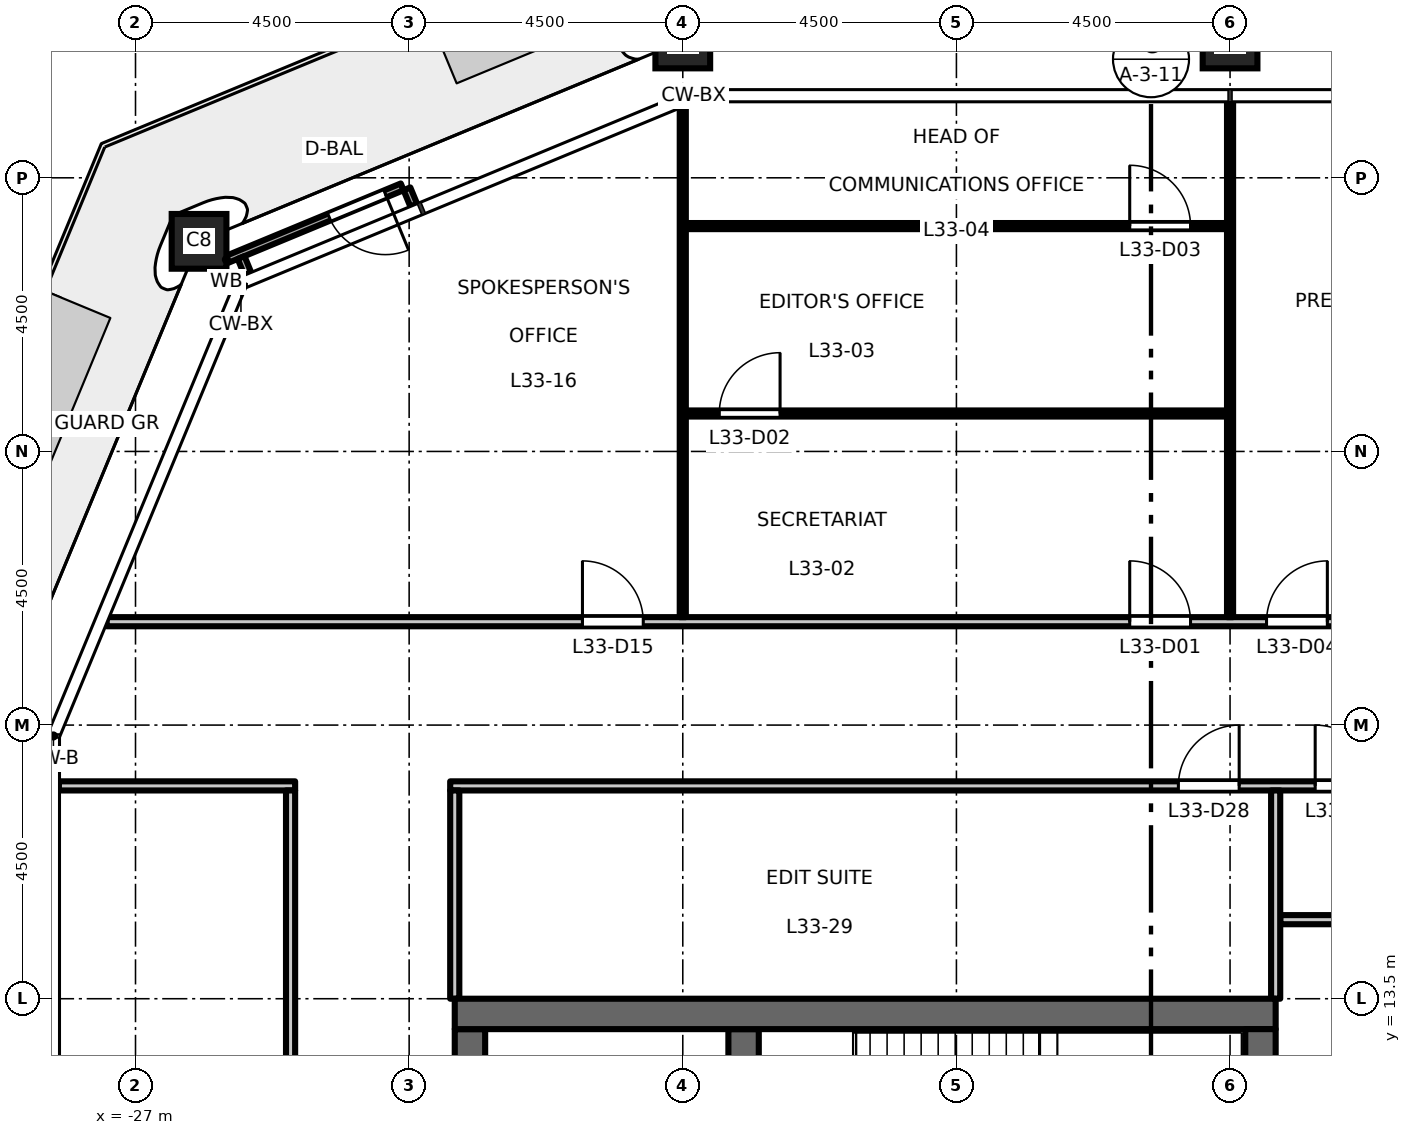
"""IFC4 building model, lengths in metres.
Left out: names, types, materials, properties, quantities, classifications, styles, units other than length and angle.
Written with IfcOpenShell. Run it as: python <this file> out.ifc"""

import sys

from ifc_helpers import new_model, si_unit, direction, frame, frame_2d, origin, origin_2d, place, context, subcontext, project, spatial, rectangle, hollow_rectangle, extrude, element, fill, save


model = new_model("IFC4")
c1 = context("Model", 3, precision=1e-05, world=origin(), true_north=direction((0.0, 1.0)))
c2 = subcontext(c1, "Body", "Model", "MODEL_VIEW")
j1 = project(units=[si_unit("LENGTHUNIT", "METRE"), si_unit("PLANEANGLEUNIT", "RADIAN")], contexts=[c1])
p1 = place(None, origin())
s1 = spatial("IfcSite", under=j1, at=p1, CompositionType="ELEMENT")
p2 = place(p1, origin())
s2 = spatial("IfcBuilding", under=s1, at=p2, CompositionType="ELEMENT")
p3 = place(p2, frame((0.0, 0.0, 154.2)))
s3 = spatial("IfcBuildingStorey", under=s2, at=p3, CompositionType="ELEMENT", Elevation=154.2)
for number, where, z_axis, x_axis in (
    (1, (-9.0, 29.25, 0.0), (0.0, 0.0, 1.0), (1.0, 0.0, 0.0)),
    (2, (-18.0, 29.25, 0.0), (0.0, 0.0, 1.0), (1.0, 0.0, 0.0)),
    (3, (-25.955, 25.955, 0.0), (0.0, 0.0, 1.0), (1.0, 0.0, 0.0)),
):
    element("IfcColumn", number, at=place(p3, frame(where, z_axis=z_axis, x_axis=x_axis)), inside=s3, PredefinedType="COLUMN", context=c2, shape_type="SweptSolid", body=[
        extrude(hollow_rectangle(XDim=0.9, YDim=0.9, WallThickness=0.05, at=origin_2d()), origin(), (0.0, 0.0, 1.0), 4.5),
    ])
p4 = place(p3, frame((-21.5, -13.0, 0.0), z_axis=(0.0, 0.0, 1.0), x_axis=(0.0, 1.0, 0.0)))
e4 = element("IfcWall", 4, at=p4, inside=s3, PredefinedType="SHEAR", context=c2, shape_type="SweptSolid", body=[
    extrude(rectangle(XDim=26.0, YDim=0.5, at=frame_2d((13.0, 0.0))), origin(), (0.0, 0.0, 1.0), 4.35),
])
p5 = place(p4, frame((16.825, 0.0, 0.0)))
e5 = element("IfcOpeningElement", 5, at=p5, cuts=e4, PredefinedType="OPENING", context=c2, shape_type="SweptSolid", body=[
    extrude(rectangle(XDim=1.8, YDim=2.1, at=frame_2d((0.9, 1.05))), frame((0.0, 0.26, 0.0), z_axis=(0.0, -1.0, 0.0), x_axis=(1.0, 0.0, 0.0)), (0.0, 0.0, 1.0), 0.52),
])
p6 = place(p4, frame((7.375, 0.0, 0.0)))
e6 = element("IfcOpeningElement", 6, at=p6, cuts=e4, PredefinedType="OPENING", context=c2, shape_type="SweptSolid", body=[
    extrude(rectangle(XDim=1.8, YDim=2.1, at=frame_2d((0.9, 1.05))), frame((0.0, 0.26, 0.0), z_axis=(0.0, -1.0, 0.0), x_axis=(1.0, 0.0, 0.0)), (0.0, 0.0, 1.0), 0.52),
])
p7 = place(p4, frame((1.3, 0.0, 0.0)))
e7 = element("IfcOpeningElement", 7, at=p7, cuts=e4, PredefinedType="OPENING", context=c2, shape_type="SweptSolid", body=[
    extrude(rectangle(XDim=0.9, YDim=2.1, at=frame_2d((0.45, 1.05))), frame((0.0, 0.26, 0.0), z_axis=(0.0, -1.0, 0.0), x_axis=(1.0, 0.0, 0.0)), (0.0, 0.0, 1.0), 0.52),
])
p8 = place(p3, frame((-17.0, 6.425, 0.0), z_axis=(0.0, 0.0, 1.0), x_axis=(0.0, 1.0, 0.0)))
e8 = element("IfcWall", 8, at=p8, inside=s3, PredefinedType="SHEAR", context=c2, shape_type="SweptSolid", body=[
    extrude(rectangle(XDim=6.575, YDim=0.5, at=frame_2d((3.288, 0.0))), origin(), (0.0, 0.0, 1.0), 4.35),
])
p9 = place(p3, frame((-8.25, 13.25, 0.0), z_axis=(0.0, 0.0, 1.0), x_axis=(-1.0, 0.0, 0.0)))
e9 = element("IfcWall", 9, at=p9, inside=s3, PredefinedType="SHEAR", context=c2, shape_type="SweptSolid", body=[
    extrude(rectangle(XDim=13.5, YDim=0.5, at=frame_2d((6.75, 0.0))), origin(), (0.0, 0.0, 1.0), 4.35),
])
p10 = place(p3, frame((-8.5, -13.0, 0.0), z_axis=(0.0, 0.0, 1.0), x_axis=(0.0, 1.0, 0.0)))
e10 = element("IfcWall", 10, at=p10, inside=s3, PredefinedType="SHEAR", context=c2, shape_type="SweptSolid", body=[
    extrude(rectangle(XDim=26.0, YDim=0.5, at=frame_2d((13.0, 0.0))), origin(), (0.0, 0.0, 1.0), 4.35),
])
for number, where, z_axis, x_axis in (
    (11, (-22.425, 26.551, 0.0), (0.0, 0.0, 1.0), (-0.382, 0.924, 0.0)),
    (12, (-25.153, 25.421, 0.0), (0.0, 0.0, 1.0), (-0.383, 0.924, 0.0)),
):
    element("IfcWall", number, at=place(p3, frame(where, z_axis=z_axis, x_axis=x_axis)), inside=s3, PredefinedType="STANDARD", context=c2, shape_type="SweptSolid", body=[
        extrude(rectangle(XDim=0.29, YDim=0.12, at=frame_2d((0.145, 0.0))), origin(), (0.0, 0.0, 1.0), 4.35),
    ])
p11 = place(p3, frame((-22.615, 26.852, 0.0), z_axis=(0.0, 0.0, 1.0), x_axis=(-0.923876066186, -0.382691800707, 0.0)))
e13 = element("IfcWall", 13, at=p11, inside=s3, PredefinedType="STANDARD", context=c2, shape_type="SweptSolid", body=[
    extrude(rectangle(XDim=3.128, YDim=0.12, at=frame_2d((1.564, 0.0))), origin(), (0.0, 0.0, 1.0), 4.35),
])
p12 = place(p11, frame((0.3, 0.0, 0.0)))
e14 = element("IfcOpeningElement", 14, at=p12, cuts=e13, PredefinedType="OPENING", context=c2, shape_type="SweptSolid", body=[
    extrude(rectangle(XDim=1.0, YDim=2.4, at=frame_2d((0.5, 1.2))), frame((0.0, 0.07, 0.0), z_axis=(0.0, -1.0, 0.0), x_axis=(1.0, 0.0, 0.0)), (0.0, 0.0, 1.0), 0.14),
])
p13 = place(p3, frame((-8.175, 14.8, 0.0), z_axis=(0.0, 0.0, 1.0), x_axis=(1.0, 0.0, 0.0)))
e15 = element("IfcWall", 15, at=p13, inside=s3, PredefinedType="PARTITIONING", context=c2, shape_type="SweptSolid", body=[
    extrude(rectangle(XDim=14.955, YDim=0.15, at=frame_2d((7.478, 0.0))), origin(), (0.0, 0.0, 1.0), 4.35),
])
p14 = place(p13, frame((4.325, 0.0, 0.0)))
e16 = element("IfcOpeningElement", 16, at=p14, cuts=e15, PredefinedType="OPENING", context=c2, shape_type="SweptSolid", body=[
    extrude(rectangle(XDim=1.0, YDim=2.1, at=frame_2d((0.5, 1.05))), frame((0.0, 0.085, 0.0), z_axis=(0.0, -1.0, 0.0), x_axis=(1.0, 0.0, 0.0)), (0.0, 0.0, 1.0), 0.17),
])
p15 = place(p13, frame((6.575, 0.0, 0.0)))
e17 = element("IfcOpeningElement", 17, at=p15, cuts=e15, PredefinedType="OPENING", context=c2, shape_type="SweptSolid", body=[
    extrude(rectangle(XDim=1.0, YDim=2.1, at=frame_2d((0.5, 1.05))), frame((0.0, 0.085, 0.0), z_axis=(0.0, -1.0, 0.0), x_axis=(1.0, 0.0, 0.0)), (0.0, 0.0, 1.0), 0.17),
])
p16 = place(p13, frame((13.325, 0.0, 0.0)))
e18 = element("IfcOpeningElement", 18, at=p16, cuts=e15, PredefinedType="OPENING", context=c2, shape_type="SweptSolid", body=[
    extrude(rectangle(XDim=1.0, YDim=2.1, at=frame_2d((0.5, 1.05))), frame((0.0, 0.085, 0.0), z_axis=(0.0, -1.0, 0.0), x_axis=(1.0, 0.0, 0.0)), (0.0, 0.0, 1.0), 0.17),
])
p17 = place(p3, frame((-28.26, 17.0, 0.0), z_axis=(0.0, 0.0, 1.0), x_axis=(1.0, 0.0, 0.0)))
e19 = element("IfcWall", 19, at=p17, inside=s3, PredefinedType="PARTITIONING", context=c2, shape_type="SweptSolid", body=[
    extrude(rectangle(XDim=3.885, YDim=0.15, at=frame_2d((1.942, 0.0))), origin(), (0.0, 0.0, 1.0), 4.35),
])
p18 = place(p3, frame((-21.825, 17.0, 0.0), z_axis=(0.0, 0.0, 1.0), x_axis=(1.0, 0.0, 0.0)))
e20 = element("IfcWall", 20, at=p18, inside=s3, PredefinedType="PARTITIONING", context=c2, shape_type="SweptSolid", body=[
    extrude(rectangle(XDim=43.65, YDim=0.15, at=frame_2d((21.825, 0.0))), origin(), (0.0, 0.0, 1.0), 4.35),
])
p19 = place(p18, frame((14.225, 0.0, 0.0)))
e21 = element("IfcOpeningElement", 21, at=p19, cuts=e20, PredefinedType="OPENING", context=c2, shape_type="SweptSolid", body=[
    extrude(rectangle(XDim=1.0, YDim=2.1, at=frame_2d((0.5, 1.05))), frame((0.0, 0.085, 0.0), z_axis=(0.0, -1.0, 0.0), x_axis=(1.0, 0.0, 0.0)), (0.0, 0.0, 1.0), 0.17),
])
p20 = place(p18, frame((11.975, 0.0, 0.0)))
e22 = element("IfcOpeningElement", 22, at=p20, cuts=e20, PredefinedType="OPENING", context=c2, shape_type="SweptSolid", body=[
    extrude(rectangle(XDim=1.0, YDim=2.1, at=frame_2d((0.5, 1.05))), frame((0.0, 0.085, 0.0), z_axis=(0.0, -1.0, 0.0), x_axis=(1.0, 0.0, 0.0)), (0.0, 0.0, 1.0), 0.17),
])
p21 = place(p18, frame((30.725, 0.0, 0.0)))
e23 = element("IfcOpeningElement", 23, at=p21, cuts=e20, PredefinedType="OPENING", context=c2, shape_type="SweptSolid", body=[
    extrude(rectangle(XDim=1.0, YDim=2.1, at=frame_2d((0.5, 1.05))), frame((0.0, 0.085, 0.0), z_axis=(0.0, -1.0, 0.0), x_axis=(1.0, 0.0, 0.0)), (0.0, 0.0, 1.0), 0.17),
])
p22 = place(p3, frame((-27.474, 19.7, 0.0), z_axis=(0.0, 0.0, 1.0), x_axis=(1.0, 0.0, 0.0)))
e24 = element("IfcWall", 24, at=p22, inside=s3, PredefinedType="PARTITIONING", context=c2, shape_type="SweptSolid", body=[
    extrude(rectangle(XDim=54.948, YDim=0.15, at=frame_2d((27.474, 0.0))), origin(), (0.0, 0.0, 1.0), 4.35),
])
p23 = place(p22, frame((16.824, 0.0, 0.0)))
e25 = element("IfcOpeningElement", 25, at=p23, cuts=e24, PredefinedType="OPENING", context=c2, shape_type="SweptSolid", body=[
    extrude(rectangle(XDim=1.0, YDim=2.1, at=frame_2d((0.5, 1.05))), frame((0.0, 0.085, 0.0), z_axis=(0.0, -1.0, 0.0), x_axis=(1.0, 0.0, 0.0)), (0.0, 0.0, 1.0), 0.17),
])
p24 = place(p22, frame((19.074, 0.0, 0.0)))
e26 = element("IfcOpeningElement", 26, at=p24, cuts=e24, PredefinedType="OPENING", context=c2, shape_type="SweptSolid", body=[
    extrude(rectangle(XDim=1.0, YDim=2.1, at=frame_2d((0.5, 1.05))), frame((0.0, 0.085, 0.0), z_axis=(0.0, -1.0, 0.0), x_axis=(1.0, 0.0, 0.0)), (0.0, 0.0, 1.0), 0.17),
])
p25 = place(p22, frame((34.824, 0.0, 0.0)))
e27 = element("IfcOpeningElement", 27, at=p25, cuts=e24, PredefinedType="OPENING", context=c2, shape_type="SweptSolid", body=[
    extrude(rectangle(XDim=1.0, YDim=2.1, at=frame_2d((0.5, 1.05))), frame((0.0, 0.085, 0.0), z_axis=(0.0, -1.0, 0.0), x_axis=(1.0, 0.0, 0.0)), (0.0, 0.0, 1.0), 0.17),
])
p26 = place(p22, frame((37.074, 0.0, 0.0)))
e28 = element("IfcOpeningElement", 28, at=p26, cuts=e24, PredefinedType="OPENING", context=c2, shape_type="SweptSolid", body=[
    extrude(rectangle(XDim=1.0, YDim=2.1, at=frame_2d((0.5, 1.05))), frame((0.0, 0.085, 0.0), z_axis=(0.0, -1.0, 0.0), x_axis=(1.0, 0.0, 0.0)), (0.0, 0.0, 1.0), 0.17),
])
p27 = place(p22, frame((7.824, 0.0, 0.0)))
e29 = element("IfcOpeningElement", 29, at=p27, cuts=e24, PredefinedType="OPENING", context=c2, shape_type="SweptSolid", body=[
    extrude(rectangle(XDim=1.0, YDim=2.1, at=frame_2d((0.5, 1.05))), frame((0.0, 0.085, 0.0), z_axis=(0.0, -1.0, 0.0), x_axis=(1.0, 0.0, 0.0)), (0.0, 0.0, 1.0), 0.17),
])
p28 = place(p22, frame((46.048, 0.0, 0.0)))
e30 = element("IfcOpeningElement", 30, at=p28, cuts=e24, PredefinedType="OPENING", context=c2, shape_type="SweptSolid", body=[
    extrude(rectangle(XDim=1.0, YDim=2.1, at=frame_2d((0.5, 1.05))), frame((0.0, 0.085, 0.0), z_axis=(0.0, -1.0, 0.0), x_axis=(1.0, 0.0, 0.0)), (0.0, 0.0, 1.0), 0.17),
])
p29 = place(p3, frame((-17.95, 23.124, 0.0), z_axis=(0.0, 0.0, 1.0), x_axis=(1.0, 0.0, 0.0)))
e31 = element("IfcWall", 31, at=p29, inside=s3, PredefinedType="PARTITIONING", context=c2, shape_type="SweptSolid", body=[
    extrude(rectangle(XDim=8.9, YDim=0.1, at=frame_2d((4.45, 0.0))), origin(), (0.0, 0.0, 1.0), 4.35),
])
p30 = place(p29, frame((0.55, 0.0, 0.0)))
e32 = element("IfcOpeningElement", 32, at=p30, cuts=e31, PredefinedType="OPENING", context=c2, shape_type="SweptSolid", body=[
    extrude(rectangle(XDim=1.0, YDim=2.1, at=frame_2d((0.5, 1.05))), frame((0.0, 0.06, 0.0), z_axis=(0.0, -1.0, 0.0), x_axis=(1.0, 0.0, 0.0)), (0.0, 0.0, 1.0), 0.12),
])
p31 = place(p3, frame((-17.95, 26.206, 0.0), z_axis=(0.0, 0.0, 1.0), x_axis=(1.0, 0.0, 0.0)))
e33 = element("IfcWall", 33, at=p31, inside=s3, PredefinedType="PARTITIONING", context=c2, shape_type="SweptSolid", body=[
    extrude(rectangle(XDim=8.9, YDim=0.1, at=frame_2d((4.45, 0.0))), origin(), (0.0, 0.0, 1.0), 4.35),
])
p32 = place(p31, frame((7.3, 0.0, 0.0)))
e34 = element("IfcOpeningElement", 34, at=p32, cuts=e33, PredefinedType="OPENING", context=c2, shape_type="SweptSolid", body=[
    extrude(rectangle(XDim=1.0, YDim=2.1, at=frame_2d((0.5, 1.05))), frame((0.0, 0.06, 0.0), z_axis=(0.0, -1.0, 0.0), x_axis=(1.0, 0.0, 0.0)), (0.0, 0.0, 1.0), 0.12),
])
p33 = place(p3, frame((-24.45, -16.925, 0.0), z_axis=(0.0, 0.0, 1.0), x_axis=(0.0, 1.0, 0.0)))
e35 = element("IfcWall", 35, at=p33, inside=s3, PredefinedType="PARTITIONING", context=c2, shape_type="SweptSolid", body=[
    extrude(rectangle(XDim=33.85, YDim=0.15, at=frame_2d((16.925, 0.0))), origin(), (0.0, 0.0, 1.0), 4.35),
])
p34 = place(p33, frame((0.525, 0.0, 0.0)))
e36 = element("IfcOpeningElement", 36, at=p34, cuts=e35, PredefinedType="OPENING", context=c2, shape_type="SweptSolid", body=[
    extrude(rectangle(XDim=1.0, YDim=2.1, at=frame_2d((0.5, 1.05))), frame((0.0, 0.085, 0.0), z_axis=(0.0, -1.0, 0.0), x_axis=(1.0, 0.0, 0.0)), (0.0, 0.0, 1.0), 0.17),
])
p35 = place(p3, frame((-21.75, 13.5, 0.0), z_axis=(0.0, 0.0, 1.0), x_axis=(0.0, 1.0, 0.0)))
e37 = element("IfcWall", 37, at=p35, inside=s3, PredefinedType="PARTITIONING", context=c2, shape_type="SweptSolid", body=[
    extrude(rectangle(XDim=3.425, YDim=0.15, at=frame_2d((1.712, 0.0))), origin(), (0.0, 0.0, 1.0), 4.35),
])
p36 = place(p3, frame((-18.0, 19.775, 0.0), z_axis=(0.0, 0.0, 1.0), x_axis=(0.0, 1.0, 0.0)))
e38 = element("IfcWall", 38, at=p36, inside=s3, PredefinedType="PARTITIONING", context=c2, shape_type="SweptSolid", body=[
    extrude(rectangle(XDim=8.403, YDim=0.1, at=frame_2d((4.202, 0.0))), origin(), (0.0, 0.0, 1.0), 3.45),
])
p37 = place(p3, frame((-9.0, 19.775, 0.0), z_axis=(0.0, 0.0, 1.0), x_axis=(0.0, 1.0, 0.0)))
e39 = element("IfcWall", 39, at=p37, inside=s3, PredefinedType="PARTITIONING", context=c2, shape_type="SweptSolid", body=[
    extrude(rectangle(XDim=8.485, YDim=0.1, at=frame_2d((4.243, 0.0))), origin(), (0.0, 0.0, 1.0), 3.45),
])
p38 = place(p3, frame((-8.25, 13.5, 0.0), z_axis=(0.0, 0.0, 1.0), x_axis=(0.0, 1.0, 0.0)))
e40 = element("IfcWall", 40, at=p38, inside=s3, PredefinedType="PARTITIONING", context=c2, shape_type="SweptSolid", body=[
    extrude(rectangle(XDim=3.425, YDim=0.15, at=frame_2d((1.712, 0.0))), origin(), (0.0, 0.0, 1.0), 4.35),
])
p39 = place(p12, origin())
e41 = element("IfcDoor", 41, at=p39, inside=s3, OperationType="SINGLE_SWING_LEFT", PredefinedType="DOOR", context=c2, shape_type="SweptSolid", body=[
    extrude(rectangle(XDim=1.0, YDim=2.4, at=frame_2d((0.5, 1.2))), frame((0.0, 0.025, 0.0), z_axis=(0.0, -1.0, 0.0), x_axis=(1.0, 0.0, 0.0)), (0.0, 0.0, 1.0), 0.05),
])
fill(e14, e41)
p40 = place(p23, origin())
e42 = element("IfcDoor", 42, at=p40, inside=s3, OperationType="SINGLE_SWING_LEFT", PredefinedType="DOOR", context=c2, shape_type="SweptSolid", body=[
    extrude(rectangle(XDim=1.0, YDim=2.1, at=frame_2d((0.5, 1.05))), frame((0.0, 0.025, 0.0), z_axis=(0.0, -1.0, 0.0), x_axis=(1.0, 0.0, 0.0)), (0.0, 0.0, 1.0), 0.05),
])
fill(e25, e42)
p41 = place(p30, origin())
e43 = element("IfcDoor", 43, at=p41, inside=s3, OperationType="SINGLE_SWING_RIGHT", PredefinedType="DOOR", context=c2, shape_type="SweptSolid", body=[
    extrude(rectangle(XDim=1.0, YDim=2.1, at=frame_2d((0.5, 1.05))), frame((0.0, 0.025, 0.0), z_axis=(0.0, -1.0, 0.0), x_axis=(1.0, 0.0, 0.0)), (0.0, 0.0, 1.0), 0.05),
])
fill(e32, e43)
p42 = place(p32, origin())
e44 = element("IfcDoor", 44, at=p42, inside=s3, OperationType="SINGLE_SWING_LEFT", PredefinedType="DOOR", context=c2, shape_type="SweptSolid", body=[
    extrude(rectangle(XDim=1.0, YDim=2.1, at=frame_2d((0.5, 1.05))), frame((0.0, 0.025, 0.0), z_axis=(0.0, -1.0, 0.0), x_axis=(1.0, 0.0, 0.0)), (0.0, 0.0, 1.0), 0.05),
])
fill(e34, e44)
p43 = place(p24, origin())
e45 = element("IfcDoor", 45, at=p43, inside=s3, OperationType="SINGLE_SWING_RIGHT", PredefinedType="DOOR", context=c2, shape_type="SweptSolid", body=[
    extrude(rectangle(XDim=1.0, YDim=2.1, at=frame_2d((0.5, 1.05))), frame((0.0, 0.025, 0.0), z_axis=(0.0, -1.0, 0.0), x_axis=(1.0, 0.0, 0.0)), (0.0, 0.0, 1.0), 0.05),
])
fill(e26, e45)
p44 = place(p27, origin())
e46 = element("IfcDoor", 46, at=p44, inside=s3, OperationType="SINGLE_SWING_LEFT", PredefinedType="DOOR", context=c2, shape_type="SweptSolid", body=[
    extrude(rectangle(XDim=1.0, YDim=2.1, at=frame_2d((0.5, 1.05))), frame((0.0, 0.025, 0.0), z_axis=(0.0, -1.0, 0.0), x_axis=(1.0, 0.0, 0.0)), (0.0, 0.0, 1.0), 0.05),
])
fill(e29, e46)
p45 = place(p19, origin())
e47 = element("IfcDoor", 47, at=p45, inside=s3, OperationType="SINGLE_SWING_LEFT", PredefinedType="DOOR", context=c2, shape_type="SweptSolid", body=[
    extrude(rectangle(XDim=1.0, YDim=2.1, at=frame_2d((0.5, 1.05))), frame((0.0, 0.025, 0.0), z_axis=(0.0, -1.0, 0.0), x_axis=(1.0, 0.0, 0.0)), (0.0, 0.0, 1.0), 0.05),
])
fill(e21, e47)
p46 = place(p20, origin())
e48 = element("IfcDoor", 48, at=p46, inside=s3, OperationType="SINGLE_SWING_RIGHT", PredefinedType="DOOR", context=c2, shape_type="SweptSolid", body=[
    extrude(rectangle(XDim=1.0, YDim=2.1, at=frame_2d((0.5, 1.05))), frame((0.0, 0.025, 0.0), z_axis=(0.0, -1.0, 0.0), x_axis=(1.0, 0.0, 0.0)), (0.0, 0.0, 1.0), 0.05),
])
fill(e22, e48)
save(model, sys.argv[1])
